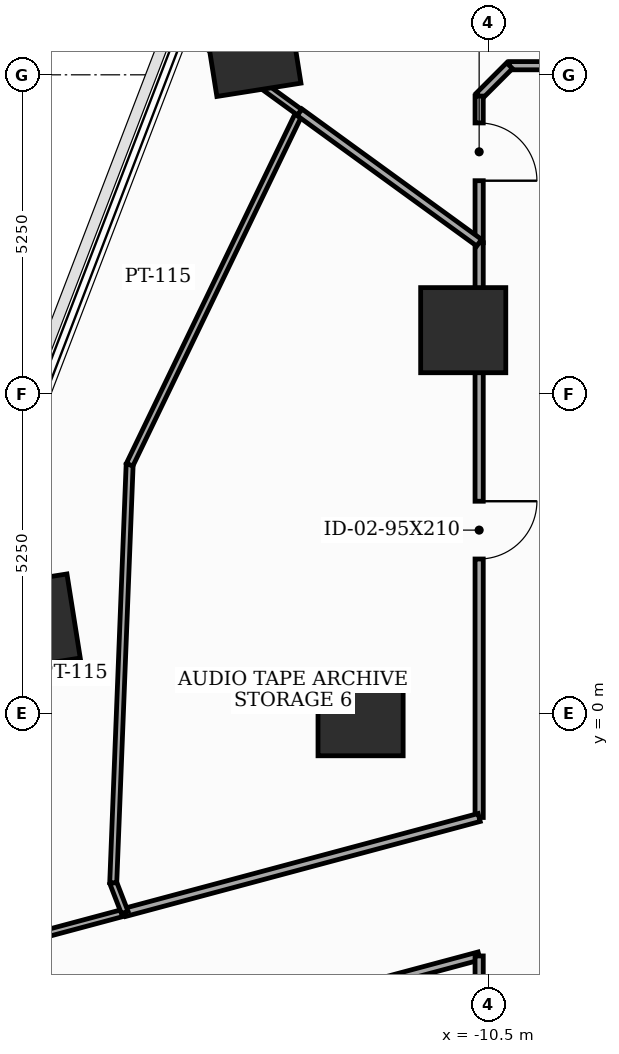
"""IFC4 building model, lengths in metres.
Left out: names, types, materials, properties, quantities, classifications, styles, units other than length and angle.
Written with IfcOpenShell. Run it as: python <this file> out.ifc"""

import sys

from ifc_helpers import new_model, si_unit, direction, frame, frame_2d, origin, origin_2d, place, context, subcontext, project, spatial, rectangle, extrude, element, fill, save


model = new_model("IFC4")
c1 = context("Model", 3, precision=1e-05, world=origin(), true_north=direction((0.0, 1.0)))
c2 = subcontext(c1, "Body", "Model", "MODEL_VIEW")
j1 = project(units=[si_unit("LENGTHUNIT", "METRE"), si_unit("PLANEANGLEUNIT", "RADIAN")], contexts=[c1])
p1 = place(None, origin())
s1 = spatial("IfcSite", under=j1, at=p1, CompositionType="ELEMENT")
p2 = place(p1, origin())
s2 = spatial("IfcBuilding", under=s1, at=p2, CompositionType="ELEMENT")
p3 = place(p2, frame((0.0, 0.0, 70.4)))
s3 = spatial("IfcBuildingStorey", under=s2, at=p3, CompositionType="ELEMENT", Elevation=70.4)
for number, where, z_axis, x_axis in (
    (1, (-10.912, 6.3, 0.0), (0.0, 0.0, 1.0), (1.0, 0.0, 0.0)),
    (2, (-12.6, 0.0, 0.0), (0.0, 0.0, 1.0), (1.0, 0.0, 0.0)),
    (3, (-14.381, 10.945, 0.0), (0.0, 0.0, 1.0), (0.988, 0.156, 0.0)),
    (4, (-18.011, 1.49, 0.0), (0.0, 0.0, 1.0), (0.988, 0.156, 0.0)),
):
    element("IfcColumn", number, at=place(p3, frame(where, z_axis=z_axis, x_axis=x_axis)), inside=s3, PredefinedType="COLUMN", context=c2, shape_type="SweptSolid", body=[
        extrude(rectangle(XDim=1.4, YDim=1.4, at=origin_2d()), origin(), (0.0, 0.0, 1.0), 3.7),
    ])
p4 = place(p3, frame((-15.677, -5.339, 0.0), z_axis=(0.0, 0.0, 1.0), x_axis=(0.965918107115, 0.258847851734, 0.0)))
e5 = element("IfcWall", 5, at=p4, inside=s3, PredefinedType="PARTITIONING", context=c2, shape_type="SweptSolid", body=[
    extrude(rectangle(XDim=5.205, YDim=0.135, at=frame_2d((2.602, 0.0))), origin(), (0.0, 0.0, 1.0), 2.785),
])
p5 = place(p3, frame((-10.65, -3.992, 0.0), z_axis=(0.0, 0.0, 1.0), x_axis=(0.0, -1.0, 0.0)))
e6 = element("IfcWall", 6, at=p5, inside=s3, PredefinedType="PARTITIONING", context=c2, shape_type="SweptSolid", body=[
    extrude(rectangle(XDim=6.158, YDim=0.135, at=frame_2d((3.079, 0.0))), origin(), (0.0, 0.0, 1.0), 2.785),
])
p6 = place(p5, frame((4.451, 0.0, 0.0)))
e7 = element("IfcOpeningElement", 7, at=p6, cuts=e6, PredefinedType="OPENING", context=c2, shape_type="SweptSolid", body=[
    extrude(rectangle(XDim=0.95, YDim=2.1, at=frame_2d((0.475, 1.05))), frame((0.0, 0.077, 0.0), z_axis=(0.0, -1.0, 0.0), x_axis=(1.0, 0.0, 0.0)), (0.0, 0.0, 1.0), 0.155),
])
p7 = place(p3, frame((-16.479, -3.277, 0.0), z_axis=(0.0, 0.0, 1.0), x_axis=(-0.965962825479, -0.258680922747, 0.0)))
e8 = element("IfcWall", 8, at=p7, inside=s3, PredefinedType="PARTITIONING", context=c2, shape_type="SweptSolid", body=[
    extrude(rectangle(XDim=3.835, YDim=0.115, at=frame_2d((1.917, 0.0))), origin(), (0.0, 0.0, 1.0), 2.935),
])
p8 = place(p3, frame((-10.65, 7.738, 0.0), z_axis=(0.0, 0.0, 1.0), x_axis=(0.0, -1.0, 0.0)))
e9 = element("IfcWall", 9, at=p8, inside=s3, PredefinedType="PARTITIONING", context=c2, shape_type="SweptSolid", body=[
    extrude(rectangle(XDim=9.453, YDim=0.135, at=frame_2d((4.727, 0.0))), origin(), (0.0, 0.0, 1.0), 2.785),
])
p9 = place(p8, frame((4.251, 0.0, 0.0)))
e10 = element("IfcOpeningElement", 10, at=p9, cuts=e9, PredefinedType="OPENING", context=c2, shape_type="SweptSolid", body=[
    extrude(rectangle(XDim=0.95, YDim=2.1, at=frame_2d((0.475, 1.05))), frame((0.0, 0.077, 0.0), z_axis=(0.0, -1.0, 0.0), x_axis=(1.0, 0.0, 0.0)), (0.0, 0.0, 1.0), 0.155),
])
p10 = place(p3, frame((-10.65, -1.715, 0.0), z_axis=(0.0, 0.0, 1.0), x_axis=(-0.965921324617, -0.258835844987, 0.0)))
e11 = element("IfcWall", 11, at=p10, inside=s3, PredefinedType="PARTITIONING", context=c2, shape_type="SweptSolid", body=[
    extrude(rectangle(XDim=6.035, YDim=0.135, at=frame_2d((3.017, 0.0))), origin(), (0.0, 0.0, 1.0), 2.785),
])
p11 = place(p3, frame((-2.655, 10.65, 0.0), z_axis=(0.0, 0.0, 1.0), x_axis=(-1.0, 0.0, 0.0)))
e12 = element("IfcWall", 12, at=p11, inside=s3, PredefinedType="PARTITIONING", context=c2, shape_type="SweptSolid", body=[
    extrude(rectangle(XDim=7.495, YDim=0.135, at=frame_2d((3.748, 0.0))), origin(), (0.0, 0.0, 1.0), 2.785),
])
p12 = place(p3, frame((-10.15, 10.65, 0.0), z_axis=(0.0, 0.0, 1.0), x_axis=(-0.707106781187, -0.707106781187, 0.0)))
e13 = element("IfcWall", 13, at=p12, inside=s3, PredefinedType="PARTITIONING", context=c2, shape_type="SweptSolid", body=[
    extrude(rectangle(XDim=0.707, YDim=0.135, at=frame_2d((0.354, 0.0))), origin(), (0.0, 0.0, 1.0), 3.5),
])
p13 = place(p3, frame((-10.65, 10.15, 0.0), z_axis=(0.0, 0.0, 1.0), x_axis=(0.0, -1.0, 0.0)))
e14 = element("IfcWall", 14, at=p13, inside=s3, PredefinedType="PARTITIONING", context=c2, shape_type="SweptSolid", body=[
    extrude(rectangle(XDim=2.412, YDim=0.135, at=frame_2d((1.206, 0.0))), origin(), (0.0, 0.0, 1.0), 3.5),
])
p14 = place(p13, frame((0.442, 0.0, 0.0)))
e15 = element("IfcOpeningElement", 15, at=p14, cuts=e14, PredefinedType="OPENING", context=c2, shape_type="SweptSolid", body=[
    extrude(rectangle(XDim=0.95, YDim=2.1, at=frame_2d((0.475, 1.05))), frame((0.0, 0.077, 0.0), z_axis=(0.0, -1.0, 0.0), x_axis=(1.0, 0.0, 0.0)), (0.0, 0.0, 1.0), 0.155),
])
p15 = place(p3, frame((-16.479, -3.277, 0.0), z_axis=(0.0, 0.0, 1.0), x_axis=(-0.361072625613, 0.932537698451, 0.0)))
e16 = element("IfcWall", 16, at=p15, inside=s3, PredefinedType="PARTITIONING", context=c2, shape_type="SweptSolid", body=[
    extrude(rectangle(XDim=0.523, YDim=0.115, at=frame_2d((0.262, 0.0))), origin(), (0.0, 0.0, 1.0), 3.5),
])
p16 = place(p3, frame((-16.668, -2.789, 0.0), z_axis=(0.0, 0.0, 1.0), x_axis=(0.039234181612, 0.99923004308, 0.0)))
e17 = element("IfcWall", 17, at=p16, inside=s3, PredefinedType="PARTITIONING", context=c2, shape_type="SweptSolid", body=[
    extrude(rectangle(XDim=6.882, YDim=0.115, at=frame_2d((3.441, 0.0))), origin(), (0.0, 0.0, 1.0), 2.785),
])
p17 = place(p3, frame((-16.398, 4.088, 0.0), z_axis=(0.0, 0.0, 1.0), x_axis=(0.434403094272, 0.900718575187, 0.0)))
e18 = element("IfcWall", 18, at=p17, inside=s3, PredefinedType="PARTITIONING", context=c2, shape_type="SweptSolid", body=[
    extrude(rectangle(XDim=6.434, YDim=0.115, at=frame_2d((3.217, 0.0))), origin(), (0.0, 0.0, 1.0), 2.785),
])
p18 = place(p3, frame((-13.603, 9.883, 0.0), z_axis=(0.0, 0.0, 1.0), x_axis=(-0.808955448279, 0.587869953901, 0.0)))
e19 = element("IfcWall", 19, at=p18, inside=s3, PredefinedType="PARTITIONING", context=c2, shape_type="SweptSolid", body=[
    extrude(rectangle(XDim=2.358, YDim=0.115, at=frame_2d((1.179, 0.0))), origin(), (0.0, 0.0, 1.0), 2.785),
])
p19 = place(p3, frame((-10.65, 7.738, 0.0), z_axis=(0.0, 0.0, 1.0), x_axis=(-0.809088823189, 0.587686375706, 0.0)))
e20 = element("IfcWall", 20, at=p19, inside=s3, PredefinedType="PARTITIONING", context=c2, shape_type="SweptSolid", body=[
    extrude(rectangle(XDim=3.65, YDim=0.135, at=frame_2d((1.825, 0.0))), origin(), (0.0, 0.0, 1.0), 2.785),
])
p20 = place(p9, origin())
e21 = element("IfcDoor", 21, at=p20, inside=s3, OperationType="SINGLE_SWING_LEFT", PredefinedType="DOOR", context=c2, shape_type="SweptSolid", body=[
    extrude(rectangle(XDim=0.95, YDim=2.1, at=frame_2d((0.475, 1.05))), frame((0.0, 0.025, 0.0), z_axis=(0.0, -1.0, 0.0), x_axis=(1.0, 0.0, 0.0)), (0.0, 0.0, 1.0), 0.05),
])
fill(e10, e21)
p21 = place(p14, origin())
e22 = element("IfcDoor", 22, at=p21, inside=s3, OperationType="SINGLE_SWING_RIGHT", PredefinedType="DOOR", context=c2, shape_type="SweptSolid", body=[
    extrude(rectangle(XDim=0.95, YDim=2.1, at=frame_2d((0.475, 1.05))), frame((0.0, 0.025, 0.0), z_axis=(0.0, -1.0, 0.0), x_axis=(1.0, 0.0, 0.0)), (0.0, 0.0, 1.0), 0.05),
])
fill(e15, e22)
save(model, sys.argv[1])
